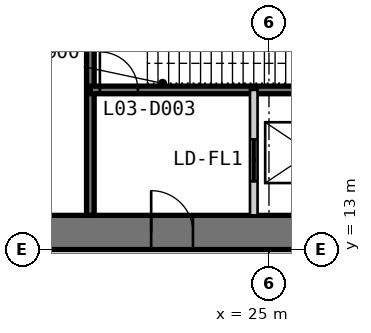
"""IFC4 building model, lengths in metres.
Left out: names, types, materials, properties, quantities, classifications, styles, units other than length and angle.
Written with IfcOpenShell. Run it as: python <this file> out.ifc"""

import sys

from ifc_helpers import new_model, si_unit, direction, frame, frame_2d, origin, place, context, subcontext, project, spatial, polyline, rectangle, outline, extrude, element, fill, save


model = new_model("IFC4")
c1 = context("Model", 3, precision=1e-05, world=origin(), true_north=direction((0.0, 1.0)))
c2 = subcontext(c1, "Body", "Model", "MODEL_VIEW")
j1 = project(units=[si_unit("LENGTHUNIT", "METRE"), si_unit("PLANEANGLEUNIT", "RADIAN")], contexts=[c1])
p1 = place(None, origin())
s1 = spatial("IfcSite", under=j1, at=p1, CompositionType="ELEMENT")
p2 = place(p1, origin())
s2 = spatial("IfcBuilding", under=s1, at=p2, CompositionType="ELEMENT")
p3 = place(p2, frame((0.0, 0.0, 16.6)))
s3 = spatial("IfcBuildingStorey", under=s2, at=p3, CompositionType="ELEMENT", Elevation=16.6)
p4 = place(p3, frame((13.0, 13.45, 0.0), z_axis=(0.0, 0.0, 1.0), x_axis=(1.0, 0.0, 0.0)))
e1 = element("IfcWall", 1, at=p4, inside=s3, PredefinedType="SHEAR", context=c2, shape_type="SweptSolid", body=[
    extrude(outline(polyline([(0.0, -0.45), (24.0, -0.45), (23.1, 0.45), (0.9, 0.45), (0.0, -0.45)])), origin(), (0.0, 0.0, 1.0), 4.8),
])
p5 = place(p4, frame((4.9, 0.0, 0.0)))
e2 = element("IfcOpeningElement", 2, at=p5, cuts=e1, PredefinedType="OPENING", context=c2, shape_type="SweptSolid", body=[
    extrude(rectangle(XDim=1.0, YDim=2.2, at=frame_2d((0.5, 1.1))), frame((0.0, 0.46, 0.0), z_axis=(0.0, -1.0, 0.0), x_axis=(1.0, 0.0, 0.0)), (0.0, 0.0, 1.0), 0.92),
])
p6 = place(p4, frame((8.9, 0.0, 0.0)))
e3 = element("IfcOpeningElement", 3, at=p6, cuts=e1, PredefinedType="OPENING", context=c2, shape_type="SweptSolid", body=[
    extrude(rectangle(XDim=1.1, YDim=2.2, at=frame_2d((0.55, 1.1))), frame((0.0, 0.46, 0.0), z_axis=(0.0, -1.0, 0.0), x_axis=(1.0, 0.0, 0.0)), (0.0, 0.0, 1.0), 0.92),
])
p7 = place(p4, frame((15.05, 0.0, 0.0)))
e4 = element("IfcOpeningElement", 4, at=p7, cuts=e1, PredefinedType="OPENING", context=c2, shape_type="SweptSolid", body=[
    extrude(rectangle(XDim=0.9, YDim=2.2, at=frame_2d((0.45, 1.1))), frame((0.0, 0.46, 0.0), z_axis=(0.0, -1.0, 0.0), x_axis=(1.0, 0.0, 0.0)), (0.0, 0.0, 1.0), 0.92),
])
p8 = place(p4, frame((17.9, 0.0, 0.0)))
e5 = element("IfcOpeningElement", 5, at=p8, cuts=e1, PredefinedType="OPENING", context=c2, shape_type="SweptSolid", body=[
    extrude(rectangle(XDim=1.0, YDim=2.2, at=frame_2d((0.5, 1.1))), frame((0.0, 0.46, 0.0), z_axis=(0.0, -1.0, 0.0), x_axis=(1.0, 0.0, 0.0)), (0.0, 0.0, 1.0), 0.92),
])
p9 = place(p4, frame((21.4, 0.0, 0.0)))
e6 = element("IfcOpeningElement", 6, at=p9, cuts=e1, PredefinedType="OPENING", context=c2, shape_type="SweptSolid", body=[
    extrude(rectangle(XDim=1.0, YDim=2.2, at=frame_2d((0.5, 1.1))), frame((0.0, 0.46, 0.0), z_axis=(0.0, -1.0, 0.0), x_axis=(1.0, 0.0, 0.0)), (0.0, 0.0, 1.0), 0.92),
])
p10 = place(p3, frame((20.3, 13.9, 0.0), z_axis=(0.0, 0.0, 1.0), x_axis=(0.0, 1.0, 0.0)))
e7 = element("IfcWall", 7, at=p10, inside=s3, PredefinedType="SOLIDWALL", context=c2, shape_type="SweptSolid", body=[
    extrude(rectangle(XDim=16.1, YDim=0.2, at=frame_2d((8.05, 0.0))), origin(), (0.0, 0.0, 1.0), 4.6),
])
p11 = place(p3, frame((20.3, 17.2, 0.0), z_axis=(0.0, 0.0, 1.0), x_axis=(1.0, 0.0, 0.0)))
e8 = element("IfcWall", 8, at=p11, inside=s3, PredefinedType="SOLIDWALL", context=c2, shape_type="SweptSolid", body=[
    extrude(rectangle(XDim=9.4, YDim=0.2, at=frame_2d((4.7, 0.0))), origin(), (0.0, 0.0, 1.0), 4.6),
])
p12 = place(p11, frame((0.25, 0.0, 0.0)))
e9 = element("IfcOpeningElement", 9, at=p12, cuts=e8, PredefinedType="OPENING", context=c2, shape_type="SweptSolid", body=[
    extrude(rectangle(XDim=1.0, YDim=2.2, at=frame_2d((0.5, 1.1))), frame((0.0, 0.11, 0.0), z_axis=(0.0, -1.0, 0.0), x_axis=(1.0, 0.0, 0.0)), (0.0, 0.0, 1.0), 0.22),
])
p13 = place(p3, frame((24.6, 13.9, 0.0), z_axis=(0.0, 0.0, 1.0), x_axis=(0.0, 1.0, 0.0)))
e10 = element("IfcWall", 10, at=p13, inside=s3, PredefinedType="PARTITIONING", context=c2, shape_type="SweptSolid", body=[
    extrude(rectangle(XDim=3.3, YDim=0.2, at=frame_2d((1.65, 0.0))), origin(), (0.0, 0.0, 1.0), 4.6),
])
p14 = place(p13, frame((0.9, 0.0, 0.0)))
e11 = element("IfcOpeningElement", 11, at=p14, cuts=e10, PredefinedType="OPENING", context=c2, shape_type="SweptSolid", body=[
    extrude(rectangle(XDim=1.1, YDim=2.2, at=frame_2d((0.55, 1.1))), frame((0.0, 0.11, 0.0), z_axis=(0.0, -1.0, 0.0), x_axis=(1.0, 0.0, 0.0)), (0.0, 0.0, 1.0), 0.22),
])
p15 = place(p6, origin())
e12 = element("IfcDoor", 12, at=p15, inside=s3, OperationType="SINGLE_SWING_LEFT", PredefinedType="DOOR", context=c2, shape_type="SweptSolid", body=[
    extrude(rectangle(XDim=1.1, YDim=2.2, at=frame_2d((0.55, 1.1))), frame((0.0, 0.025, 0.0), z_axis=(0.0, -1.0, 0.0), x_axis=(1.0, 0.0, 0.0)), (0.0, 0.0, 1.0), 0.05),
    extrude(outline(polyline([(0.0, 0.0), (0.04, 0.0), (0.04, 2.16), (1.06, 2.16), (1.06, 0.0), (1.1, 0.0), (1.1, 2.2), (0.0, 2.2), (0.0, 0.0)])), frame((0.0, 0.3, 0.0), z_axis=(0.0, -1.0, 0.0), x_axis=(1.0, 0.0, 0.0)), (0.0, 0.0, 1.0), 0.6),
])
fill(e3, e12)
p16 = place(p12, origin())
e13 = element("IfcDoor", 13, at=p16, inside=s3, OperationType="SINGLE_SWING_LEFT", PredefinedType="DOOR", context=c2, shape_type="SweptSolid", body=[
    extrude(rectangle(XDim=1.0, YDim=2.2, at=frame_2d((0.5, 1.1))), frame((0.0, 0.025, 0.0), z_axis=(0.0, -1.0, 0.0), x_axis=(1.0, 0.0, 0.0)), (0.0, 0.0, 1.0), 0.05),
])
fill(e9, e13)
p17 = place(p14, origin())
e14 = element("IfcDoor", 14, at=p17, inside=s3, OperationType="DOUBLE_DOOR_SLIDING", PredefinedType="DOOR", context=c2, shape_type="SweptSolid", body=[
    extrude(rectangle(XDim=1.1, YDim=2.2, at=frame_2d((0.55, 1.1))), frame((0.0, 0.025, 0.0), z_axis=(0.0, -1.0, 0.0), x_axis=(1.0, 0.0, 0.0)), (0.0, 0.0, 1.0), 0.05),
])
fill(e11, e14)
save(model, sys.argv[1])
